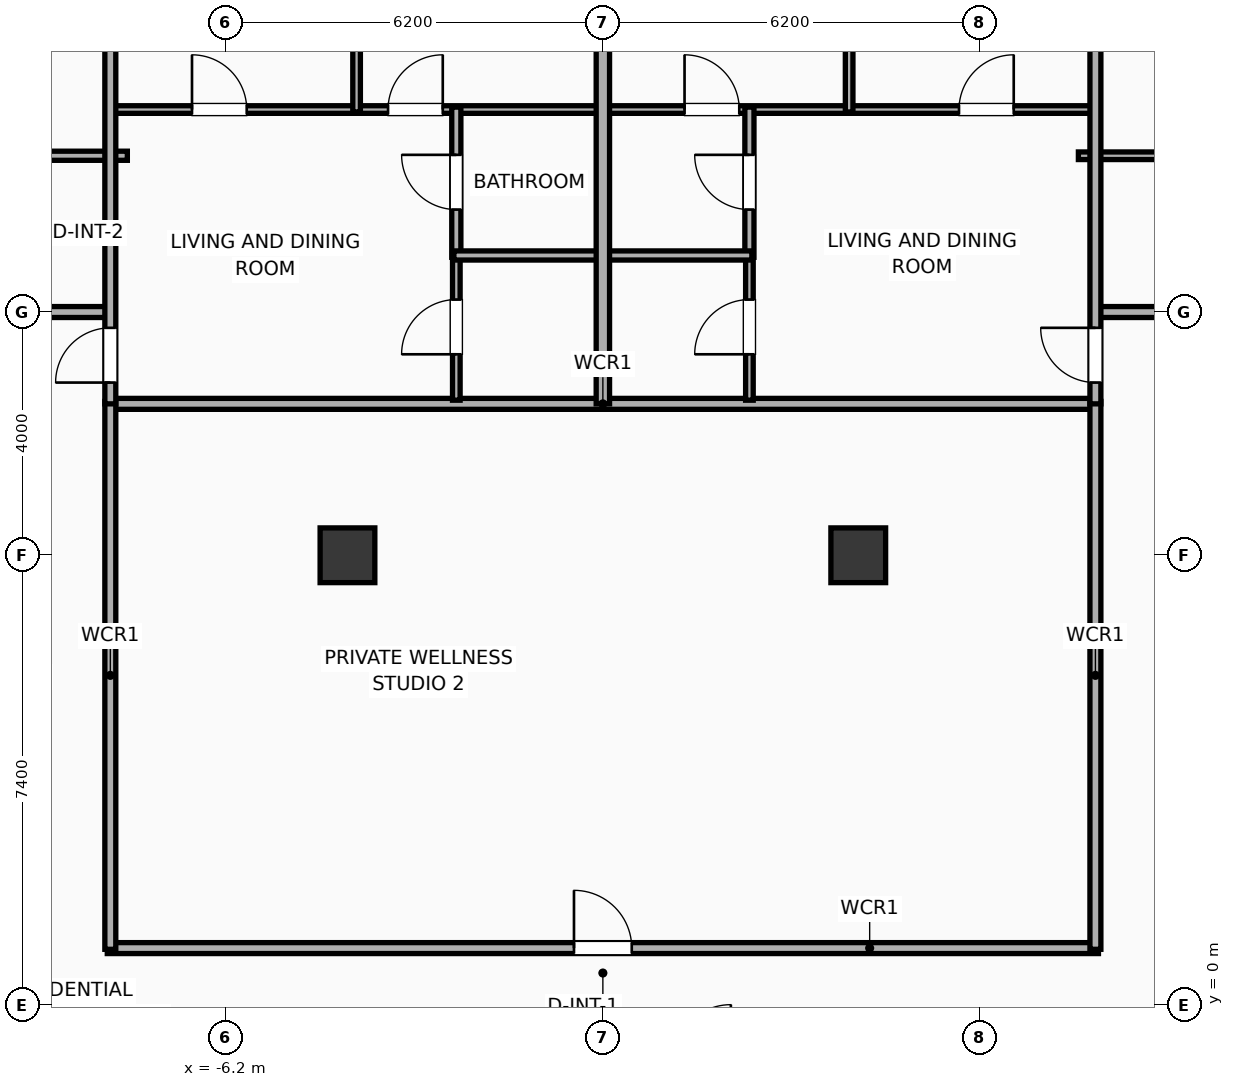
"""IFC4 building model, lengths in metres.
Left out: names, types, materials, properties, quantities, classifications, styles, units other than length and angle.
Written with IfcOpenShell. Run it as: python <this file> out.ifc"""

import sys

from ifc_helpers import new_model, si_unit, direction, frame, frame_2d, origin, origin_2d, place, context, subcontext, project, spatial, rectangle, extrude, element, fill, save


model = new_model("IFC4")
c1 = context("Model", 3, precision=1e-05, world=origin(), true_north=direction((0.0, 1.0)))
c2 = subcontext(c1, "Body", "Model", "MODEL_VIEW")
j1 = project(units=[si_unit("LENGTHUNIT", "METRE"), si_unit("PLANEANGLEUNIT", "RADIAN")], contexts=[c1])
p1 = place(None, origin())
s1 = spatial("IfcSite", under=j1, at=p1, CompositionType="ELEMENT")
p2 = place(p1, origin())
s2 = spatial("IfcBuilding", under=s1, at=p2, CompositionType="ELEMENT")
p3 = place(p2, frame((0.0, 0.0, 152.1)))
s3 = spatial("IfcBuildingStorey", under=s2, at=p3, CompositionType="ELEMENT", Elevation=152.1)
for number, where, z_axis, x_axis in (
    (1, (-4.2, 7.4, 0.0), (0.0, 0.0, 1.0), (1.0, 0.0, 0.0)),
    (2, (4.2, 7.4, 0.0), (0.0, 0.0, 1.0), (1.0, 0.0, 0.0)),
):
    element("IfcColumn", number, at=place(p3, frame(where, z_axis=z_axis, x_axis=x_axis)), inside=s3, PredefinedType="COLUMN", context=c2, shape_type="SweptSolid", body=[
        extrude(rectangle(XDim=0.9, YDim=0.9, at=origin_2d()), origin(), (0.0, 0.0, 1.0), 3.9),
    ])
p4 = place(p3, frame((-8.15, 9.89, 0.0), z_axis=(0.0, 0.0, 1.0), x_axis=(1.0, 0.0, 0.0)))
e3 = element("IfcWall", 3, at=p4, inside=s3, PredefinedType="PARTITIONING", context=c2, shape_type="SweptSolid", body=[
    extrude(rectangle(XDim=16.3, YDim=0.18, at=frame_2d((8.15, 0.0))), origin(), (0.0, 0.0, 1.0), 3.65),
])
p5 = place(p3, frame((-8.15, 0.94, 0.0), z_axis=(0.0, 0.0, 1.0), x_axis=(1.0, 0.0, 0.0)))
e4 = element("IfcWall", 4, at=p5, inside=s3, PredefinedType="PARTITIONING", context=c2, shape_type="SweptSolid", body=[
    extrude(rectangle(XDim=16.3, YDim=0.18, at=frame_2d((8.15, 0.0))), origin(), (0.0, 0.0, 1.0), 3.65),
])
p6 = place(p5, frame((7.675, 0.0, 0.0)))
e5 = element("IfcOpeningElement", 5, at=p6, cuts=e4, PredefinedType="OPENING", context=c2, shape_type="SweptSolid", body=[
    extrude(rectangle(XDim=0.95, YDim=2.05, at=frame_2d((0.475, 1.025))), frame((0.0, 0.1, 0.0), z_axis=(0.0, -1.0, 0.0), x_axis=(1.0, 0.0, 0.0)), (0.0, 0.0, 1.0), 0.2),
])
for number, where, z_axis, x_axis in (
    (6, (-8.1, 0.92, 0.0), (0.0, 0.0, 1.0), (0.0, 1.0, 0.0)),
    (7, (8.1, 0.92, 0.0), (0.0, 0.0, 1.0), (0.0, 1.0, 0.0)),
):
    element("IfcWall", number, at=place(p3, frame(where, z_axis=z_axis, x_axis=x_axis)), inside=s3, PredefinedType="PARTITIONING", context=c2, shape_type="SweptSolid", body=[
        extrude(rectangle(XDim=9.01, YDim=0.18, at=frame_2d((4.505, 0.0))), origin(), (0.0, 0.0, 1.0), 3.65),
    ])
p7 = place(p3, frame((-10.126, 13.97, 0.0), z_axis=(0.0, 0.0, 1.0), x_axis=(1.0, 0.0, 0.0)))
e8 = element("IfcWall", 8, at=p7, inside=s3, PredefinedType="PLUMBINGWALL", context=c2, shape_type="SweptSolid", body=[
    extrude(rectangle(XDim=2.306, YDim=0.15, at=frame_2d((1.153, 0.0))), origin(), (0.0, 0.0, 1.0), 3.65),
])
p8 = place(p3, frame((7.82, 13.97, 0.0), z_axis=(0.0, 0.0, 1.0), x_axis=(1.0, 0.0, 0.0)))
e9 = element("IfcWall", 9, at=p8, inside=s3, PredefinedType="PARTITIONING", context=c2, shape_type="SweptSolid", body=[
    extrude(rectangle(XDim=2.63, YDim=0.125, at=frame_2d((1.315, 0.0))), origin(), (0.0, 0.0, 1.0), 3.65),
])
p9 = place(p3, frame((-19.665, 11.4, 0.0), z_axis=(0.0, 0.0, 1.0), x_axis=(1.0, 0.0, 0.0)))
e10 = element("IfcWall", 10, at=p9, inside=s3, PredefinedType="PARTITIONING", context=c2, shape_type="SweptSolid", body=[
    extrude(rectangle(XDim=11.585, YDim=0.18, at=frame_2d((5.792, 0.0))), origin(), (0.0, 0.0, 1.0), 3.65),
])
p10 = place(p9, frame((3.468, 0.0, 0.0)))
e11 = element("IfcOpeningElement", 11, at=p10, cuts=e10, PredefinedType="OPENING", context=c2, shape_type="SweptSolid", body=[
    extrude(rectangle(XDim=1.15, YDim=2.05, at=frame_2d((0.575, 1.025))), frame((0.0, 0.1, 0.0), z_axis=(0.0, -1.0, 0.0), x_axis=(1.0, 0.0, 0.0)), (0.0, 0.0, 1.0), 0.2),
])
p11 = place(p9, frame((8.404, 0.0, 0.0)))
e12 = element("IfcOpeningElement", 12, at=p11, cuts=e10, PredefinedType="OPENING", context=c2, shape_type="SweptSolid", body=[
    extrude(rectangle(XDim=0.9, YDim=2.05, at=frame_2d((0.45, 1.025))), frame((0.0, 0.1, 0.0), z_axis=(0.0, -1.0, 0.0), x_axis=(1.0, 0.0, 0.0)), (0.0, 0.0, 1.0), 0.2),
])
p12 = place(p3, frame((8.08, 11.4, 0.0), z_axis=(0.0, 0.0, 1.0), x_axis=(1.0, 0.0, 0.0)))
e13 = element("IfcWall", 13, at=p12, inside=s3, PredefinedType="PARTITIONING", context=c2, shape_type="SweptSolid", body=[
    extrude(rectangle(XDim=11.67, YDim=0.18, at=frame_2d((5.835, 0.0))), origin(), (0.0, 0.0, 1.0), 3.65),
])
p13 = place(p12, frame((2.604, 0.0, 0.0)))
e14 = element("IfcOpeningElement", 14, at=p13, cuts=e13, PredefinedType="OPENING", context=c2, shape_type="SweptSolid", body=[
    extrude(rectangle(XDim=0.9, YDim=2.05, at=frame_2d((0.45, 1.025))), frame((0.0, 0.1, 0.0), z_axis=(0.0, -1.0, 0.0), x_axis=(1.0, 0.0, 0.0)), (0.0, 0.0, 1.0), 0.2),
])
p14 = place(p12, frame((7.016, 0.0, 0.0)))
e15 = element("IfcOpeningElement", 15, at=p14, cuts=e13, PredefinedType="OPENING", context=c2, shape_type="SweptSolid", body=[
    extrude(rectangle(XDim=1.15, YDim=2.05, at=frame_2d((0.575, 1.025))), frame((0.0, 0.1, 0.0), z_axis=(0.0, -1.0, 0.0), x_axis=(1.0, 0.0, 0.0)), (0.0, 0.0, 1.0), 0.2),
])
p15 = place(p3, frame((-8.08, 14.73, 0.0), z_axis=(0.0, 0.0, 1.0), x_axis=(1.0, 0.0, 0.0)))
e16 = element("IfcWall", 16, at=p15, inside=s3, PredefinedType="PARTITIONING", context=c2, shape_type="SweptSolid", body=[
    extrude(rectangle(XDim=8.06, YDim=0.125, at=frame_2d((4.03, 0.0))), origin(), (0.0, 0.0, 1.0), 3.65),
])
p16 = place(p15, frame((1.323, 0.0, 0.0)))
e17 = element("IfcOpeningElement", 17, at=p16, cuts=e16, PredefinedType="OPENING", context=c2, shape_type="SweptSolid", body=[
    extrude(rectangle(XDim=0.9, YDim=2.05, at=frame_2d((0.45, 1.025))), frame((0.0, 0.073, 0.0), z_axis=(0.0, -1.0, 0.0), x_axis=(1.0, 0.0, 0.0)), (0.0, 0.0, 1.0), 0.145),
])
p17 = place(p15, frame((4.547, 0.0, 0.0)))
e18 = element("IfcOpeningElement", 18, at=p17, cuts=e16, PredefinedType="OPENING", context=c2, shape_type="SweptSolid", body=[
    extrude(rectangle(XDim=0.9, YDim=2.05, at=frame_2d((0.45, 1.025))), frame((0.0, 0.073, 0.0), z_axis=(0.0, -1.0, 0.0), x_axis=(1.0, 0.0, 0.0)), (0.0, 0.0, 1.0), 0.145),
])
p18 = place(p3, frame((-2.41, 9.95, 0.0), z_axis=(0.0, 0.0, 1.0), x_axis=(0.0, 1.0, 0.0)))
e19 = element("IfcWall", 19, at=p18, inside=s3, PredefinedType="PARTITIONING", context=c2, shape_type="SweptSolid", body=[
    extrude(rectangle(XDim=2.41, YDim=0.125, at=frame_2d((1.205, 0.0))), origin(), (0.0, 0.0, 1.0), 3.65),
])
p19 = place(p18, frame((0.755, 0.0, 0.0)))
e20 = element("IfcOpeningElement", 20, at=p19, cuts=e19, PredefinedType="OPENING", context=c2, shape_type="SweptSolid", body=[
    extrude(rectangle(XDim=0.9, YDim=2.05, at=frame_2d((0.45, 1.025))), frame((0.0, 0.073, 0.0), z_axis=(0.0, -1.0, 0.0), x_axis=(1.0, 0.0, 0.0)), (0.0, 0.0, 1.0), 0.145),
])
p20 = place(p3, frame((-2.41, 12.3, 0.0), z_axis=(0.0, 0.0, 1.0), x_axis=(0.0, 1.0, 0.0)))
e21 = element("IfcWall", 21, at=p20, inside=s3, PredefinedType="PLUMBINGWALL", context=c2, shape_type="SweptSolid", body=[
    extrude(rectangle(XDim=2.47, YDim=0.15, at=frame_2d((1.235, 0.0))), origin(), (0.0, 0.0, 1.0), 3.04),
])
p21 = place(p20, frame((0.785, 0.0, 0.0)))
e22 = element("IfcOpeningElement", 22, at=p21, cuts=e21, PredefinedType="OPENING", context=c2, shape_type="SweptSolid", body=[
    extrude(rectangle(XDim=0.9, YDim=2.05, at=frame_2d((0.45, 1.025))), frame((0.0, 0.085, 0.0), z_axis=(0.0, -1.0, 0.0), x_axis=(1.0, 0.0, 0.0)), (0.0, 0.0, 1.0), 0.17),
])
p22 = place(p3, frame((-2.45, 12.33, 0.0), z_axis=(0.0, 0.0, 1.0), x_axis=(1.0, 0.0, 0.0)))
e23 = element("IfcWall", 23, at=p22, inside=s3, PredefinedType="PLUMBINGWALL", context=c2, shape_type="SweptSolid", body=[
    extrude(rectangle(XDim=2.43, YDim=0.15, at=frame_2d((1.215, 0.0))), origin(), (0.0, 0.0, 1.0), 3.65),
])
p23 = place(p3, frame((-4.05, 14.69, 0.0), z_axis=(0.0, 0.0, 1.0), x_axis=(0.0, 1.0, 0.0)))
e24 = element("IfcWall", 24, at=p23, inside=s3, PredefinedType="PARTITIONING", context=c2, shape_type="SweptSolid", body=[
    extrude(rectangle(XDim=4.962, YDim=0.125, at=frame_2d((2.481, 0.0))), origin(), (0.0, 0.0, 1.0), 3.65),
])
p24 = place(p3, frame((-8.1, 9.89, 0.0), z_axis=(0.0, 0.0, 1.0), x_axis=(0.0, 1.0, 0.0)))
e25 = element("IfcWall", 25, at=p24, inside=s3, PredefinedType="PARTITIONING", context=c2, shape_type="SweptSolid", body=[
    extrude(rectangle(XDim=9.336, YDim=0.18, at=frame_2d((4.668, 0.0))), origin(), (0.0, 0.0, 1.0), 3.65),
])
p25 = place(p24, frame((0.35, 0.0, 0.0)))
e26 = element("IfcOpeningElement", 26, at=p25, cuts=e25, PredefinedType="OPENING", context=c2, shape_type="SweptSolid", body=[
    extrude(rectangle(XDim=0.9, YDim=2.05, at=frame_2d((0.45, 1.025))), frame((0.0, 0.1, 0.0), z_axis=(0.0, -1.0, 0.0), x_axis=(1.0, 0.0, 0.0)), (0.0, 0.0, 1.0), 0.2),
])
p26 = place(p3, frame((0.02, 14.73, 0.0), z_axis=(0.0, 0.0, 1.0), x_axis=(1.0, 0.0, 0.0)))
e27 = element("IfcWall", 27, at=p26, inside=s3, PredefinedType="PARTITIONING", context=c2, shape_type="SweptSolid", body=[
    extrude(rectangle(XDim=8.06, YDim=0.125, at=frame_2d((4.03, 0.0))), origin(), (0.0, 0.0, 1.0), 3.65),
])
p27 = place(p26, frame((1.323, 0.0, 0.0)))
e28 = element("IfcOpeningElement", 28, at=p27, cuts=e27, PredefinedType="OPENING", context=c2, shape_type="SweptSolid", body=[
    extrude(rectangle(XDim=0.9, YDim=2.05, at=frame_2d((0.45, 1.025))), frame((0.0, 0.073, 0.0), z_axis=(0.0, -1.0, 0.0), x_axis=(1.0, 0.0, 0.0)), (0.0, 0.0, 1.0), 0.145),
])
p28 = place(p26, frame((5.837, 0.0, 0.0)))
e29 = element("IfcOpeningElement", 29, at=p28, cuts=e27, PredefinedType="OPENING", context=c2, shape_type="SweptSolid", body=[
    extrude(rectangle(XDim=0.9, YDim=2.05, at=frame_2d((0.45, 1.025))), frame((0.0, 0.073, 0.0), z_axis=(0.0, -1.0, 0.0), x_axis=(1.0, 0.0, 0.0)), (0.0, 0.0, 1.0), 0.145),
])
p29 = place(p3, frame((2.41, 9.95, 0.0), z_axis=(0.0, 0.0, 1.0), x_axis=(0.0, 1.0, 0.0)))
e30 = element("IfcWall", 30, at=p29, inside=s3, PredefinedType="PARTITIONING", context=c2, shape_type="SweptSolid", body=[
    extrude(rectangle(XDim=2.41, YDim=0.125, at=frame_2d((1.205, 0.0))), origin(), (0.0, 0.0, 1.0), 3.65),
])
p30 = place(p29, frame((0.755, 0.0, 0.0)))
e31 = element("IfcOpeningElement", 31, at=p30, cuts=e30, PredefinedType="OPENING", context=c2, shape_type="SweptSolid", body=[
    extrude(rectangle(XDim=0.9, YDim=2.05, at=frame_2d((0.45, 1.025))), frame((0.0, 0.073, 0.0), z_axis=(0.0, -1.0, 0.0), x_axis=(1.0, 0.0, 0.0)), (0.0, 0.0, 1.0), 0.145),
])
p31 = place(p3, frame((2.41, 12.3, 0.0), z_axis=(0.0, 0.0, 1.0), x_axis=(0.0, 1.0, 0.0)))
e32 = element("IfcWall", 32, at=p31, inside=s3, PredefinedType="PLUMBINGWALL", context=c2, shape_type="SweptSolid", body=[
    extrude(rectangle(XDim=2.47, YDim=0.15, at=frame_2d((1.235, 0.0))), origin(), (0.0, 0.0, 1.0), 3.65),
])
p32 = place(p31, frame((0.785, 0.0, 0.0)))
e33 = element("IfcOpeningElement", 33, at=p32, cuts=e32, PredefinedType="OPENING", context=c2, shape_type="SweptSolid", body=[
    extrude(rectangle(XDim=0.9, YDim=2.05, at=frame_2d((0.45, 1.025))), frame((0.0, 0.085, 0.0), z_axis=(0.0, -1.0, 0.0), x_axis=(1.0, 0.0, 0.0)), (0.0, 0.0, 1.0), 0.17),
])
p33 = place(p3, frame((0.02, 12.33, 0.0), z_axis=(0.0, 0.0, 1.0), x_axis=(1.0, 0.0, 0.0)))
e34 = element("IfcWall", 34, at=p33, inside=s3, PredefinedType="PLUMBINGWALL", context=c2, shape_type="SweptSolid", body=[
    extrude(rectangle(XDim=2.43, YDim=0.15, at=frame_2d((1.215, 0.0))), origin(), (0.0, 0.0, 1.0), 3.65),
])
p34 = place(p3, frame((4.05, 14.69, 0.0), z_axis=(0.0, 0.0, 1.0), x_axis=(0.0, 1.0, 0.0)))
e35 = element("IfcWall", 35, at=p34, inside=s3, PredefinedType="PARTITIONING", context=c2, shape_type="SweptSolid", body=[
    extrude(rectangle(XDim=5.813, YDim=0.125, at=frame_2d((2.907, 0.0))), origin(), (0.0, 0.0, 1.0), 3.65),
])
p35 = place(p3, frame((8.1, 9.89, 0.0), z_axis=(0.0, 0.0, 1.0), x_axis=(0.0, 1.0, 0.0)))
e36 = element("IfcWall", 36, at=p35, inside=s3, PredefinedType="PARTITIONING", context=c2, shape_type="SweptSolid", body=[
    extrude(rectangle(XDim=11.039, YDim=0.18, at=frame_2d((5.52, 0.0))), origin(), (0.0, 0.0, 1.0), 3.65),
])
p36 = place(p35, frame((0.35, 0.0, 0.0)))
e37 = element("IfcOpeningElement", 37, at=p36, cuts=e36, PredefinedType="OPENING", context=c2, shape_type="SweptSolid", body=[
    extrude(rectangle(XDim=0.9, YDim=2.05, at=frame_2d((0.45, 1.025))), frame((0.0, 0.1, 0.0), z_axis=(0.0, -1.0, 0.0), x_axis=(1.0, 0.0, 0.0)), (0.0, 0.0, 1.0), 0.2),
])
p37 = place(p3, frame((0.0, 9.89, 0.0), z_axis=(0.0, 0.0, 1.0), x_axis=(0.0, 1.0, 0.0)))
e38 = element("IfcWall", 38, at=p37, inside=s3, PredefinedType="PARTITIONING", context=c2, shape_type="SweptSolid", body=[
    extrude(rectangle(XDim=10.188, YDim=0.22, at=frame_2d((5.094, 0.0))), origin(), (0.0, 0.0, 1.0), 3.04),
])
p38 = place(p6, origin())
e39 = element("IfcDoor", 39, at=p38, inside=s3, OperationType="SINGLE_SWING_LEFT", PredefinedType="DOOR", context=c2, shape_type="SweptSolid", body=[
    extrude(rectangle(XDim=0.95, YDim=2.05, at=frame_2d((0.475, 1.025))), frame((0.0, 0.025, 0.0), z_axis=(0.0, -1.0, 0.0), x_axis=(1.0, 0.0, 0.0)), (0.0, 0.0, 1.0), 0.05),
])
fill(e5, e39)
p39 = place(p16, origin())
e40 = element("IfcDoor", 40, at=p39, inside=s3, OperationType="SINGLE_SWING_LEFT", PredefinedType="DOOR", context=c2, shape_type="SweptSolid", body=[
    extrude(rectangle(XDim=0.9, YDim=2.05, at=frame_2d((0.45, 1.025))), frame((0.0, 0.025, 0.0), z_axis=(0.0, -1.0, 0.0), x_axis=(1.0, 0.0, 0.0)), (0.0, 0.0, 1.0), 0.05),
])
fill(e17, e40)
p40 = place(p17, origin())
e41 = element("IfcDoor", 41, at=p40, inside=s3, OperationType="SINGLE_SWING_RIGHT", PredefinedType="DOOR", context=c2, shape_type="SweptSolid", body=[
    extrude(rectangle(XDim=0.9, YDim=2.05, at=frame_2d((0.45, 1.025))), frame((0.0, 0.025, 0.0), z_axis=(0.0, -1.0, 0.0), x_axis=(1.0, 0.0, 0.0)), (0.0, 0.0, 1.0), 0.05),
])
fill(e18, e41)
p41 = place(p19, origin())
e42 = element("IfcDoor", 42, at=p41, inside=s3, OperationType="SINGLE_SWING_LEFT", PredefinedType="DOOR", context=c2, shape_type="SweptSolid", body=[
    extrude(rectangle(XDim=0.9, YDim=2.05, at=frame_2d((0.45, 1.025))), frame((0.0, 0.025, 0.0), z_axis=(0.0, -1.0, 0.0), x_axis=(1.0, 0.0, 0.0)), (0.0, 0.0, 1.0), 0.05),
])
fill(e20, e42)
p42 = place(p21, origin())
e43 = element("IfcDoor", 43, at=p42, inside=s3, OperationType="SINGLE_SWING_RIGHT", PredefinedType="DOOR", context=c2, shape_type="SweptSolid", body=[
    extrude(rectangle(XDim=0.9, YDim=2.05, at=frame_2d((0.45, 1.025))), frame((0.0, 0.025, 0.0), z_axis=(0.0, -1.0, 0.0), x_axis=(1.0, 0.0, 0.0)), (0.0, 0.0, 1.0), 0.05),
])
fill(e22, e43)
p43 = place(p25, origin())
e44 = element("IfcDoor", 44, at=p43, inside=s3, OperationType="SINGLE_SWING_LEFT", PredefinedType="DOOR", context=c2, shape_type="SweptSolid", body=[
    extrude(rectangle(XDim=0.9, YDim=2.05, at=frame_2d((0.45, 1.025))), frame((0.0, 0.025, 0.0), z_axis=(0.0, -1.0, 0.0), x_axis=(1.0, 0.0, 0.0)), (0.0, 0.0, 1.0), 0.05),
])
fill(e26, e44)
p44 = place(p27, origin())
e45 = element("IfcDoor", 45, at=p44, inside=s3, OperationType="SINGLE_SWING_LEFT", PredefinedType="DOOR", context=c2, shape_type="SweptSolid", body=[
    extrude(rectangle(XDim=0.9, YDim=2.05, at=frame_2d((0.45, 1.025))), frame((0.0, 0.025, 0.0), z_axis=(0.0, -1.0, 0.0), x_axis=(1.0, 0.0, 0.0)), (0.0, 0.0, 1.0), 0.05),
])
fill(e28, e45)
p45 = place(p28, origin())
e46 = element("IfcDoor", 46, at=p45, inside=s3, OperationType="SINGLE_SWING_RIGHT", PredefinedType="DOOR", context=c2, shape_type="SweptSolid", body=[
    extrude(rectangle(XDim=0.9, YDim=2.05, at=frame_2d((0.45, 1.025))), frame((0.0, 0.025, 0.0), z_axis=(0.0, -1.0, 0.0), x_axis=(1.0, 0.0, 0.0)), (0.0, 0.0, 1.0), 0.05),
])
fill(e29, e46)
p46 = place(p30, origin())
e47 = element("IfcDoor", 47, at=p46, inside=s3, OperationType="SINGLE_SWING_LEFT", PredefinedType="DOOR", context=c2, shape_type="SweptSolid", body=[
    extrude(rectangle(XDim=0.9, YDim=2.05, at=frame_2d((0.45, 1.025))), frame((0.0, 0.025, 0.0), z_axis=(0.0, -1.0, 0.0), x_axis=(1.0, 0.0, 0.0)), (0.0, 0.0, 1.0), 0.05),
])
fill(e31, e47)
p47 = place(p32, origin())
e48 = element("IfcDoor", 48, at=p47, inside=s3, OperationType="SINGLE_SWING_RIGHT", PredefinedType="DOOR", context=c2, shape_type="SweptSolid", body=[
    extrude(rectangle(XDim=0.9, YDim=2.05, at=frame_2d((0.45, 1.025))), frame((0.0, 0.025, 0.0), z_axis=(0.0, -1.0, 0.0), x_axis=(1.0, 0.0, 0.0)), (0.0, 0.0, 1.0), 0.05),
])
fill(e33, e48)
p48 = place(p36, origin())
e49 = element("IfcDoor", 49, at=p48, inside=s3, OperationType="SINGLE_SWING_RIGHT", PredefinedType="DOOR", context=c2, shape_type="SweptSolid", body=[
    extrude(rectangle(XDim=0.9, YDim=2.05, at=frame_2d((0.45, 1.025))), frame((0.0, 0.025, 0.0), z_axis=(0.0, -1.0, 0.0), x_axis=(1.0, 0.0, 0.0)), (0.0, 0.0, 1.0), 0.05),
])
fill(e37, e49)
save(model, sys.argv[1])
